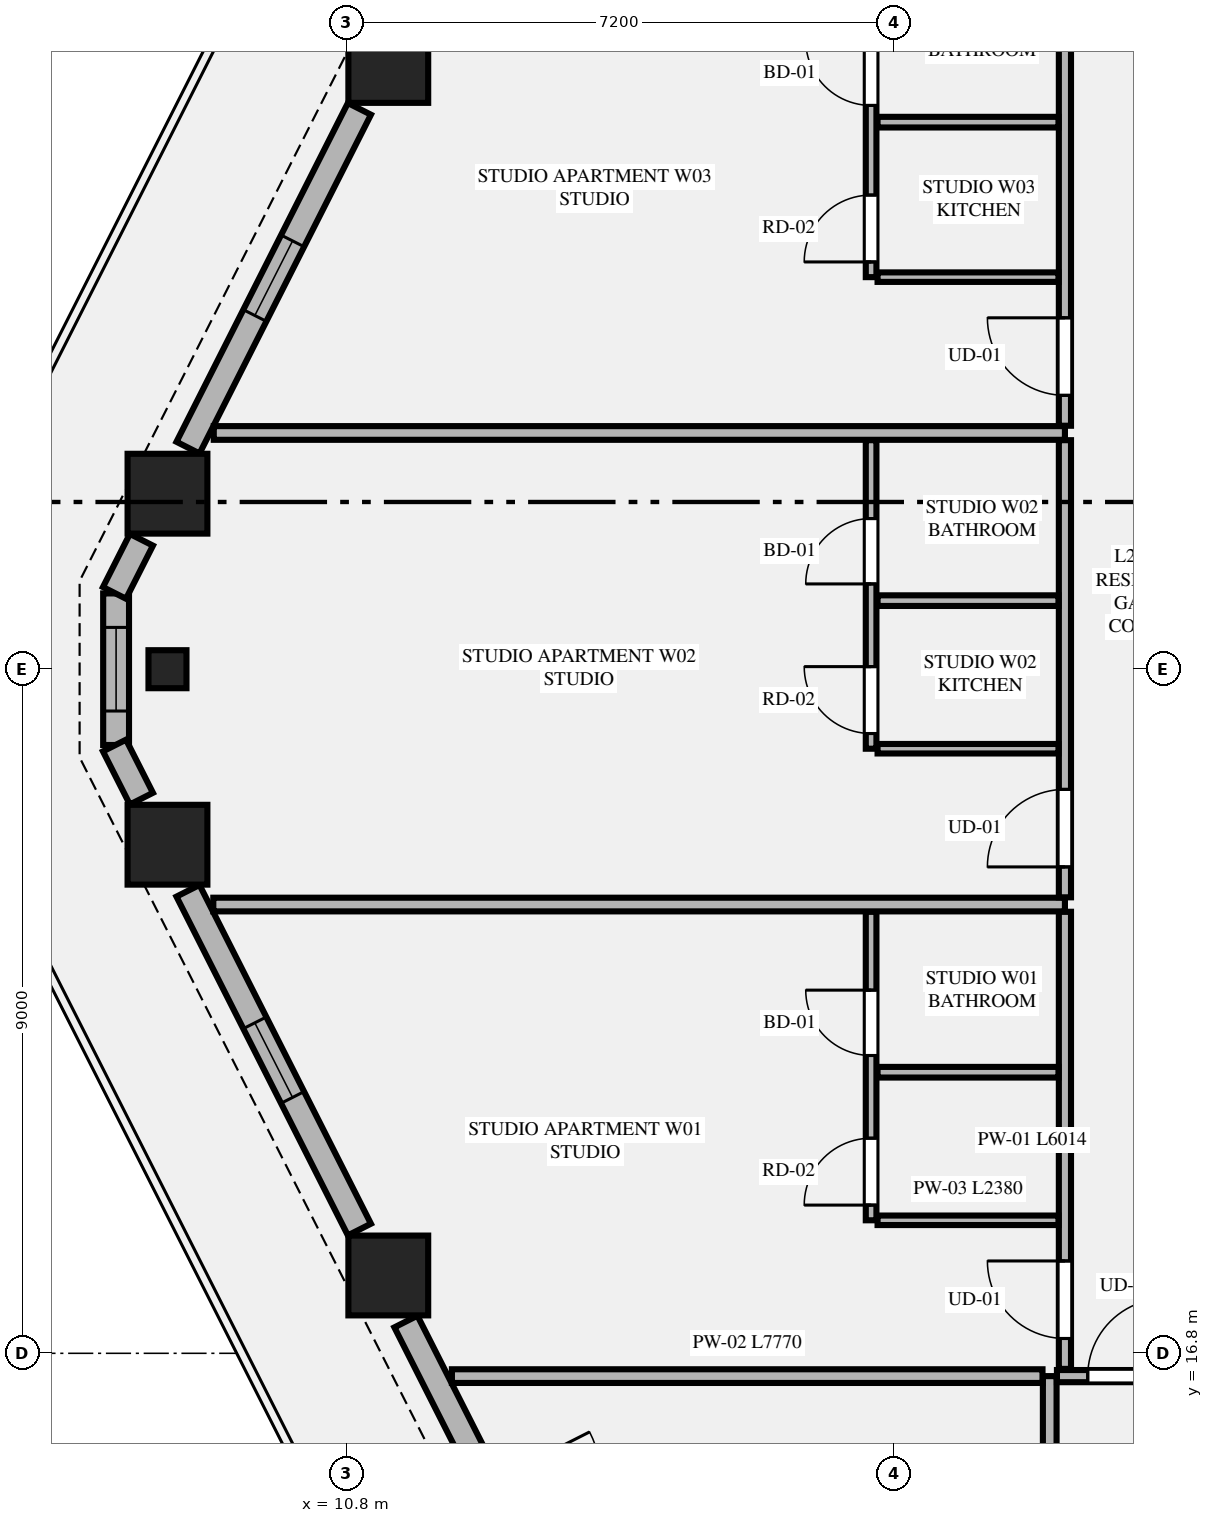
"""IFC4 building model, lengths in metres.
Left out: names, types, materials, properties, quantities, classifications, styles, units other than length and angle.
Written with IfcOpenShell. Run it as: python <this file> out.ifc"""

import sys

from ifc_helpers import new_model, si_unit, direction, frame, frame_2d, origin, origin_2d, place, context, subcontext, project, spatial, rectangle, extrude, element, fill, save


model = new_model("IFC4")
c1 = context("Model", 3, precision=1e-05, world=origin(), true_north=direction((0.0, 1.0)))
c2 = subcontext(c1, "Body", "Model", "MODEL_VIEW")
j1 = project(units=[si_unit("LENGTHUNIT", "METRE"), si_unit("PLANEANGLEUNIT", "RADIAN")], contexts=[c1])
p1 = place(None, origin())
s1 = spatial("IfcSite", under=j1, at=p1, CompositionType="ELEMENT")
p2 = place(p1, origin())
s2 = spatial("IfcBuilding", under=s1, at=p2, CompositionType="ELEMENT")
p3 = place(p2, frame((0.0, 0.0, 98.4)))
s3 = spatial("IfcBuildingStorey", under=s2, at=p3, CompositionType="ELEMENT", Elevation=98.4)
for number, where, z_axis, x_axis in (
    (1, (11.348, 33.776, 0.0), (0.0, 0.0, 1.0), (1.0, 0.0, 0.0)),
    (2, (8.443, 28.109, 0.0), (0.0, 0.0, 1.0), (1.0, 0.0, 0.0)),
    (3, (8.443, 23.491, 0.0), (0.0, 0.0, 1.0), (1.0, 0.0, 0.0)),
    (4, (11.348, 17.824, 0.0), (0.0, 0.0, 1.0), (1.0, 0.0, 0.0)),
):
    element("IfcColumn", number, at=place(p3, frame(where, z_axis=z_axis, x_axis=x_axis)), inside=s3, PredefinedType="COLUMN", context=c2, shape_type="SweptSolid", body=[
        extrude(rectangle(XDim=1.05, YDim=1.05, at=origin_2d()), origin(), (0.0, 0.0, 1.0), 3.55),
    ])
p4 = place(p3, frame((8.443, 25.8, 0.0), z_axis=(0.0, 0.0, 1.0), x_axis=(0.0, -1.0, 0.0)))
e5 = element("IfcColumn", 5, at=p4, inside=s3, PredefinedType="PILASTER", context=c2, shape_type="SweptSolid", body=[
    extrude(rectangle(XDim=0.5, YDim=0.35, at=origin_2d()), origin(), (0.0, 0.0, 1.0), 3.55),
])
p5 = place(p3, frame((7.767, 26.797, 0.0), z_axis=(0.0, 0.0, 1.0), x_axis=(0.0, -1.0, 0.0)))
e6 = element("IfcWall", 6, at=p5, inside=s3, PredefinedType="STANDARD", context=c2, shape_type="SweptSolid", body=[
    extrude(rectangle(XDim=1.994, YDim=0.34, at=frame_2d((0.997, 0.0))), origin(), (0.0, 0.0, 1.0), 3.34),
])
p6 = place(p5, frame((0.447, 0.0, 0.75)))
e7 = element("IfcOpeningElement", 7, at=p6, cuts=e6, PredefinedType="OPENING", context=c2, shape_type="SweptSolid", body=[
    extrude(rectangle(XDim=1.1, YDim=2.0, at=frame_2d((0.55, 1.0))), frame((0.0, 0.18, 0.0), z_axis=(0.0, -1.0, 0.0), x_axis=(1.0, 0.0, 0.0)), (0.0, 0.0, 1.0), 0.36),
])
p7 = place(p3, frame((10.968, 33.172, 0.0), z_axis=(0.0, 0.0, 1.0), x_axis=(-0.451470533039, -0.892286029139, 0.0)))
e8 = element("IfcWall", 8, at=p7, inside=s3, PredefinedType="STANDARD", context=c2, shape_type="SweptSolid", body=[
    extrude(rectangle(XDim=4.995, YDim=0.34, at=frame_2d((2.498, 0.0))), origin(), (0.0, 0.0, 1.0), 2.797),
])
p8 = place(p7, frame((1.947, 0.0, 0.75)))
e9 = element("IfcOpeningElement", 9, at=p8, cuts=e8, PredefinedType="OPENING", context=c2, shape_type="SweptSolid", body=[
    extrude(rectangle(XDim=1.1, YDim=1.897, at=frame_2d((0.55, 0.948))), frame((0.0, 0.18, 0.0), z_axis=(0.0, -1.0, 0.0), x_axis=(1.0, 0.0, 0.0)), (0.0, 0.0, 1.0), 0.36),
])
for number, where, z_axis, x_axis in (
    (10, (8.1, 27.503, 0.0), (0.0, 0.0, 1.0), (-0.452, -0.892, 0.0)),
    (11, (7.746, 24.796, 0.0), (0.0, 0.0, 1.0), (0.452, -0.892, 0.0)),
):
    element("IfcWall", number, at=place(p3, frame(where, z_axis=z_axis, x_axis=x_axis)), inside=s3, PredefinedType="STANDARD", context=c2, shape_type="SweptSolid", body=[
        extrude(rectangle(XDim=0.783, YDim=0.34, at=frame_2d((0.392, 0.0))), origin(), (0.0, 0.0, 1.0), 3.34),
    ])
p9 = place(p3, frame((8.713, 22.885, 0.0), z_axis=(0.0, 0.0, 1.0), x_axis=(0.451470533039, -0.892286029139, 0.0)))
e12 = element("IfcWall", 12, at=p9, inside=s3, PredefinedType="STANDARD", context=c2, shape_type="SweptSolid", body=[
    extrude(rectangle(XDim=4.995, YDim=0.34, at=frame_2d((2.498, 0.0))), origin(), (0.0, 0.0, 1.0), 2.797),
])
p10 = place(p9, frame((1.947, 0.0, 0.75)))
e13 = element("IfcOpeningElement", 13, at=p10, cuts=e12, PredefinedType="OPENING", context=c2, shape_type="SweptSolid", body=[
    extrude(rectangle(XDim=1.1, YDim=1.897, at=frame_2d((0.55, 0.948))), frame((0.0, 0.18, 0.0), z_axis=(0.0, -1.0, 0.0), x_axis=(1.0, 0.0, 0.0)), (0.0, 0.0, 1.0), 0.36),
])
p11 = place(p3, frame((11.58, 17.218, 0.0), z_axis=(0.0, 0.0, 1.0), x_axis=(0.451567731634, -0.892236842855, 0.0)))
e14 = element("IfcWall", 14, at=p11, inside=s3, PredefinedType="STANDARD", context=c2, shape_type="SweptSolid", body=[
    extrude(rectangle(XDim=5.219, YDim=0.34, at=frame_2d((2.61, 0.0))), origin(), (0.0, 0.0, 1.0), 2.797),
])
p12 = place(p11, frame((2.387, 0.0, 0.0)))
e15 = element("IfcOpeningElement", 15, at=p12, cuts=e14, PredefinedType="OPENING", context=c2, shape_type="SweptSolid", body=[
    extrude(rectangle(XDim=1.5, YDim=2.3, at=frame_2d((0.75, 1.15))), frame((0.0, 0.18, 0.0), z_axis=(0.0, -1.0, 0.0), x_axis=(1.0, 0.0, 0.0)), (0.0, 0.0, 1.0), 0.36),
])
p13 = place(p3, frame((20.05, 4.105, 0.0), z_axis=(0.0, 0.0, 1.0), x_axis=(0.0, 1.0, 0.0)))
e16 = element("IfcWall", 16, at=p13, inside=s3, PredefinedType="PARTITIONING", context=c2, shape_type="SweptSolid", body=[
    extrude(rectangle(XDim=12.395, YDim=0.18, at=frame_2d((6.198, 0.0))), origin(), (0.0, 0.0, 1.0), 3.34),
])
p14 = place(p3, frame((20.145, 16.5, 0.0), z_axis=(0.0, 0.0, 1.0), x_axis=(1.0, 0.0, 0.0)))
e17 = element("IfcWall", 17, at=p14, inside=s3, PredefinedType="PARTITIONING", context=c2, shape_type="SweptSolid", body=[
    extrude(rectangle(XDim=8.328, YDim=0.16, at=frame_2d((4.164, 0.0))), origin(), (0.0, 0.0, 1.0), 3.34),
])
p15 = place(p14, frame((0.405, 0.0, 0.0)))
e18 = element("IfcOpeningElement", 18, at=p15, cuts=e17, PredefinedType="OPENING", context=c2, shape_type="SweptSolid", body=[
    extrude(rectangle(XDim=1.02, YDim=2.25, at=frame_2d((0.51, 1.125))), frame((0.0, 0.09, 0.0), z_axis=(0.0, -1.0, 0.0), x_axis=(1.0, 0.0, 0.0)), (0.0, 0.0, 1.0), 0.18),
])
p16 = place(p3, frame((12.185, 16.5, 0.0), z_axis=(0.0, 0.0, 1.0), x_axis=(1.0, 0.0, 0.0)))
e19 = element("IfcWall", 19, at=p16, inside=s3, PredefinedType="PARTITIONING", context=c2, shape_type="SweptSolid", body=[
    extrude(rectangle(XDim=7.77, YDim=0.18, at=frame_2d((3.885, 0.0))), origin(), (0.0, 0.0, 1.0), 3.34),
])
p17 = place(p3, frame((20.25, 16.595, 0.0), z_axis=(0.0, 0.0, 1.0), x_axis=(0.0, 1.0, 0.0)))
e20 = element("IfcWall", 20, at=p17, inside=s3, PredefinedType="PARTITIONING", context=c2, shape_type="SweptSolid", body=[
    extrude(rectangle(XDim=6.014, YDim=0.16, at=frame_2d((3.007, 0.0))), origin(), (0.0, 0.0, 1.0), 3.34),
])
p18 = place(p17, frame((0.4, 0.0, 0.0)))
e21 = element("IfcOpeningElement", 21, at=p18, cuts=e20, PredefinedType="OPENING", context=c2, shape_type="SweptSolid", body=[
    extrude(rectangle(XDim=1.02, YDim=2.25, at=frame_2d((0.51, 1.125))), frame((0.0, 0.09, 0.0), z_axis=(0.0, -1.0, 0.0), x_axis=(1.0, 0.0, 0.0)), (0.0, 0.0, 1.0), 0.18),
])
p19 = place(p3, frame((17.785, 18.55, 0.0), z_axis=(0.0, 0.0, 1.0), x_axis=(1.0, 0.0, 0.0)))
e22 = element("IfcWall", 22, at=p19, inside=s3, PredefinedType="PARTITIONING", context=c2, shape_type="SweptSolid", body=[
    extrude(rectangle(XDim=2.38, YDim=0.125, at=frame_2d((1.19, 0.0))), origin(), (0.0, 0.0, 1.0), 2.722),
])
p20 = place(p3, frame((17.7, 18.55, 0.0), z_axis=(0.0, 0.0, 1.0), x_axis=(0.0, 1.0, 0.0)))
e23 = element("IfcWall", 23, at=p20, inside=s3, PredefinedType="PLUMBINGWALL", context=c2, shape_type="SweptSolid", body=[
    extrude(rectangle(XDim=4.059, YDim=0.14, at=frame_2d((2.029, 0.0))), origin(), (0.0, 0.0, 1.0), 3.34),
])
p21 = place(p20, frame((2.168, 0.0, 0.0)))
e24 = element("IfcOpeningElement", 24, at=p21, cuts=e23, PredefinedType="OPENING", context=c2, shape_type="SweptSolid", body=[
    extrude(rectangle(XDim=0.86, YDim=2.1, at=frame_2d((0.43, 1.05))), frame((0.0, 0.08, 0.0), z_axis=(0.0, -1.0, 0.0), x_axis=(1.0, 0.0, 0.0)), (0.0, 0.0, 1.0), 0.16),
])
p22 = place(p20, frame((0.2, 0.0, 0.0)))
e25 = element("IfcOpeningElement", 25, at=p22, cuts=e23, PredefinedType="OPENING", context=c2, shape_type="SweptSolid", body=[
    extrude(rectangle(XDim=0.88, YDim=2.15, at=frame_2d((0.44, 1.075))), frame((0.0, 0.08, 0.0), z_axis=(0.0, -1.0, 0.0), x_axis=(1.0, 0.0, 0.0)), (0.0, 0.0, 1.0), 0.16),
])
p23 = place(p3, frame((17.785, 20.498, 0.0), z_axis=(0.0, 0.0, 1.0), x_axis=(1.0, 0.0, 0.0)))
e26 = element("IfcWall", 26, at=p23, inside=s3, PredefinedType="PLUMBINGWALL", context=c2, shape_type="SweptSolid", body=[
    extrude(rectangle(XDim=2.38, YDim=0.14, at=frame_2d((1.19, 0.0))), origin(), (0.0, 0.0, 1.0), 3.34),
])
p24 = place(p3, frame((9.046, 22.704, 0.0), z_axis=(0.0, 0.0, 1.0), x_axis=(1.0, 0.0, 0.0)))
e27 = element("IfcWall", 27, at=p24, inside=s3, PredefinedType="PARTITIONING", context=c2, shape_type="SweptSolid", body=[
    extrude(rectangle(XDim=11.204, YDim=0.18, at=frame_2d((5.602, 0.0))), origin(), (0.0, 0.0, 1.0), 3.34),
])
p25 = place(p3, frame((20.25, 22.799, 0.0), z_axis=(0.0, 0.0, 1.0), x_axis=(0.0, 1.0, 0.0)))
e28 = element("IfcWall", 28, at=p25, inside=s3, PredefinedType="PARTITIONING", context=c2, shape_type="SweptSolid", body=[
    extrude(rectangle(XDim=6.014, YDim=0.16, at=frame_2d((3.007, 0.0))), origin(), (0.0, 0.0, 1.0), 3.34),
])
p26 = place(p25, frame((0.4, 0.0, 0.0)))
e29 = element("IfcOpeningElement", 29, at=p26, cuts=e28, PredefinedType="OPENING", context=c2, shape_type="SweptSolid", body=[
    extrude(rectangle(XDim=1.02, YDim=2.25, at=frame_2d((0.51, 1.125))), frame((0.0, 0.09, 0.0), z_axis=(0.0, -1.0, 0.0), x_axis=(1.0, 0.0, 0.0)), (0.0, 0.0, 1.0), 0.18),
])
p27 = place(p3, frame((17.785, 24.754, 0.0), z_axis=(0.0, 0.0, 1.0), x_axis=(1.0, 0.0, 0.0)))
e30 = element("IfcWall", 30, at=p27, inside=s3, PredefinedType="PARTITIONING", context=c2, shape_type="SweptSolid", body=[
    extrude(rectangle(XDim=2.38, YDim=0.125, at=frame_2d((1.19, 0.0))), origin(), (0.0, 0.0, 1.0), 3.34),
])
p28 = place(p3, frame((17.7, 24.754, 0.0), z_axis=(0.0, 0.0, 1.0), x_axis=(0.0, 1.0, 0.0)))
e31 = element("IfcWall", 31, at=p28, inside=s3, PredefinedType="PLUMBINGWALL", context=c2, shape_type="SweptSolid", body=[
    extrude(rectangle(XDim=4.059, YDim=0.14, at=frame_2d((2.03, 0.0))), origin(), (0.0, 0.0, 1.0), 3.34),
])
p29 = place(p28, frame((2.168, 0.0, 0.0)))
e32 = element("IfcOpeningElement", 32, at=p29, cuts=e31, PredefinedType="OPENING", context=c2, shape_type="SweptSolid", body=[
    extrude(rectangle(XDim=0.86, YDim=2.1, at=frame_2d((0.43, 1.05))), frame((0.0, 0.08, 0.0), z_axis=(0.0, -1.0, 0.0), x_axis=(1.0, 0.0, 0.0)), (0.0, 0.0, 1.0), 0.16),
])
p30 = place(p28, frame((0.2, 0.0, 0.0)))
e33 = element("IfcOpeningElement", 33, at=p30, cuts=e31, PredefinedType="OPENING", context=c2, shape_type="SweptSolid", body=[
    extrude(rectangle(XDim=0.88, YDim=2.15, at=frame_2d((0.44, 1.075))), frame((0.0, 0.08, 0.0), z_axis=(0.0, -1.0, 0.0), x_axis=(1.0, 0.0, 0.0)), (0.0, 0.0, 1.0), 0.16),
])
p31 = place(p3, frame((17.785, 26.702, 0.0), z_axis=(0.0, 0.0, 1.0), x_axis=(1.0, 0.0, 0.0)))
e34 = element("IfcWall", 34, at=p31, inside=s3, PredefinedType="PLUMBINGWALL", context=c2, shape_type="SweptSolid", body=[
    extrude(rectangle(XDim=2.38, YDim=0.14, at=frame_2d((1.19, 0.0))), origin(), (0.0, 0.0, 1.0), 3.34),
])
p32 = place(p3, frame((9.052, 28.908, 0.0), z_axis=(0.0, 0.0, 1.0), x_axis=(1.0, 0.0, 0.0)))
e35 = element("IfcWall", 35, at=p32, inside=s3, PredefinedType="PARTITIONING", context=c2, shape_type="SweptSolid", body=[
    extrude(rectangle(XDim=11.198, YDim=0.18, at=frame_2d((5.599, 0.0))), origin(), (0.0, 0.0, 1.0), 3.34),
])
p33 = place(p3, frame((20.25, 29.003, 0.0), z_axis=(0.0, 0.0, 1.0), x_axis=(0.0, 1.0, 0.0)))
e36 = element("IfcWall", 36, at=p33, inside=s3, PredefinedType="PARTITIONING", context=c2, shape_type="SweptSolid", body=[
    extrude(rectangle(XDim=6.202, YDim=0.16, at=frame_2d((3.101, 0.0))), origin(), (0.0, 0.0, 1.0), 3.34),
])
p34 = place(p33, frame((0.4, 0.0, 0.0)))
e37 = element("IfcOpeningElement", 37, at=p34, cuts=e36, PredefinedType="OPENING", context=c2, shape_type="SweptSolid", body=[
    extrude(rectangle(XDim=1.02, YDim=2.25, at=frame_2d((0.51, 1.125))), frame((0.0, 0.09, 0.0), z_axis=(0.0, -1.0, 0.0), x_axis=(1.0, 0.0, 0.0)), (0.0, 0.0, 1.0), 0.18),
])
p35 = place(p3, frame((17.785, 30.958, 0.0), z_axis=(0.0, 0.0, 1.0), x_axis=(1.0, 0.0, 0.0)))
e38 = element("IfcWall", 38, at=p35, inside=s3, PredefinedType="PARTITIONING", context=c2, shape_type="SweptSolid", body=[
    extrude(rectangle(XDim=2.38, YDim=0.125, at=frame_2d((1.19, 0.0))), origin(), (0.0, 0.0, 1.0), 3.34),
])
p36 = place(p3, frame((17.7, 30.958, 0.0), z_axis=(0.0, 0.0, 1.0), x_axis=(0.0, 1.0, 0.0)))
e39 = element("IfcWall", 39, at=p36, inside=s3, PredefinedType="PLUMBINGWALL", context=c2, shape_type="SweptSolid", body=[
    extrude(rectangle(XDim=4.247, YDim=0.14, at=frame_2d((2.124, 0.0))), origin(), (0.0, 0.0, 1.0), 3.34),
])
p37 = place(p36, frame((2.259, 0.0, 0.0)))
e40 = element("IfcOpeningElement", 40, at=p37, cuts=e39, PredefinedType="OPENING", context=c2, shape_type="SweptSolid", body=[
    extrude(rectangle(XDim=0.86, YDim=2.1, at=frame_2d((0.43, 1.05))), frame((0.0, 0.08, 0.0), z_axis=(0.0, -1.0, 0.0), x_axis=(1.0, 0.0, 0.0)), (0.0, 0.0, 1.0), 0.16),
])
p38 = place(p36, frame((0.2, 0.0, 0.0)))
e41 = element("IfcOpeningElement", 41, at=p38, cuts=e39, PredefinedType="OPENING", context=c2, shape_type="SweptSolid", body=[
    extrude(rectangle(XDim=0.88, YDim=2.15, at=frame_2d((0.44, 1.075))), frame((0.0, 0.08, 0.0), z_axis=(0.0, -1.0, 0.0), x_axis=(1.0, 0.0, 0.0)), (0.0, 0.0, 1.0), 0.16),
])
p39 = place(p3, frame((17.785, 32.997, 0.0), z_axis=(0.0, 0.0, 1.0), x_axis=(1.0, 0.0, 0.0)))
e42 = element("IfcWall", 42, at=p39, inside=s3, PredefinedType="PLUMBINGWALL", context=c2, shape_type="SweptSolid", body=[
    extrude(rectangle(XDim=2.38, YDim=0.14, at=frame_2d((1.19, 0.0))), origin(), (0.0, 0.0, 1.0), 3.34),
])
p40 = place(p8, origin())
e43 = element("IfcWindow", 43, at=p40, inside=s3, PartitioningType="SINGLE_PANEL", PredefinedType="WINDOW", context=c2, shape_type="SweptSolid", body=[
    extrude(rectangle(XDim=1.1, YDim=1.897, at=frame_2d((0.55, 0.948))), frame((0.0, 0.03, 0.0), z_axis=(0.0, -1.0, 0.0), x_axis=(1.0, 0.0, 0.0)), (0.0, 0.0, 1.0), 0.06),
])
fill(e9, e43)
p41 = place(p10, origin())
e44 = element("IfcWindow", 44, at=p41, inside=s3, PartitioningType="SINGLE_PANEL", PredefinedType="WINDOW", context=c2, shape_type="SweptSolid", body=[
    extrude(rectangle(XDim=1.1, YDim=1.897, at=frame_2d((0.55, 0.948))), frame((0.0, 0.03, 0.0), z_axis=(0.0, -1.0, 0.0), x_axis=(1.0, 0.0, 0.0)), (0.0, 0.0, 1.0), 0.06),
])
fill(e13, e44)
p42 = place(p15, origin())
e45 = element("IfcDoor", 45, at=p42, inside=s3, OperationType="SINGLE_SWING_RIGHT", PredefinedType="DOOR", context=c2, shape_type="SweptSolid", body=[
    extrude(rectangle(XDim=1.02, YDim=2.25, at=frame_2d((0.51, 1.125))), frame((0.0, 0.025, 0.0), z_axis=(0.0, -1.0, 0.0), x_axis=(1.0, 0.0, 0.0)), (0.0, 0.0, 1.0), 0.05),
])
fill(e18, e45)
p43 = place(p21, origin())
e46 = element("IfcDoor", 46, at=p43, inside=s3, OperationType="SINGLE_SWING_RIGHT", PredefinedType="DOOR", context=c2, shape_type="SweptSolid", body=[
    extrude(rectangle(XDim=0.86, YDim=2.1, at=frame_2d((0.43, 1.05))), frame((0.0, 0.025, 0.0), z_axis=(0.0, -1.0, 0.0), x_axis=(1.0, 0.0, 0.0)), (0.0, 0.0, 1.0), 0.05),
])
fill(e24, e46)
p44 = place(p18, origin())
e47 = element("IfcDoor", 47, at=p44, inside=s3, OperationType="SINGLE_SWING_RIGHT", PredefinedType="DOOR", context=c2, shape_type="SweptSolid", body=[
    extrude(rectangle(XDim=1.02, YDim=2.25, at=frame_2d((0.51, 1.125))), frame((0.0, 0.025, 0.0), z_axis=(0.0, -1.0, 0.0), x_axis=(1.0, 0.0, 0.0)), (0.0, 0.0, 1.0), 0.05),
])
fill(e21, e47)
p45 = place(p22, origin())
e48 = element("IfcDoor", 48, at=p45, inside=s3, OperationType="SINGLE_SWING_LEFT", PredefinedType="DOOR", context=c2, shape_type="SweptSolid", body=[
    extrude(rectangle(XDim=0.88, YDim=2.15, at=frame_2d((0.44, 1.075))), frame((0.0, 0.025, 0.0), z_axis=(0.0, -1.0, 0.0), x_axis=(1.0, 0.0, 0.0)), (0.0, 0.0, 1.0), 0.05),
])
fill(e25, e48)
p46 = place(p29, origin())
e49 = element("IfcDoor", 49, at=p46, inside=s3, OperationType="SINGLE_SWING_LEFT", PredefinedType="DOOR", context=c2, shape_type="SweptSolid", body=[
    extrude(rectangle(XDim=0.86, YDim=2.1, at=frame_2d((0.43, 1.05))), frame((0.0, 0.025, 0.0), z_axis=(0.0, -1.0, 0.0), x_axis=(1.0, 0.0, 0.0)), (0.0, 0.0, 1.0), 0.05),
])
fill(e32, e49)
p47 = place(p26, origin())
e50 = element("IfcDoor", 50, at=p47, inside=s3, OperationType="SINGLE_SWING_LEFT", PredefinedType="DOOR", context=c2, shape_type="SweptSolid", body=[
    extrude(rectangle(XDim=1.02, YDim=2.25, at=frame_2d((0.51, 1.125))), frame((0.0, 0.025, 0.0), z_axis=(0.0, -1.0, 0.0), x_axis=(1.0, 0.0, 0.0)), (0.0, 0.0, 1.0), 0.05),
])
fill(e29, e50)
p48 = place(p30, origin())
e51 = element("IfcDoor", 51, at=p48, inside=s3, OperationType="SINGLE_SWING_RIGHT", PredefinedType="DOOR", context=c2, shape_type="SweptSolid", body=[
    extrude(rectangle(XDim=0.88, YDim=2.15, at=frame_2d((0.44, 1.075))), frame((0.0, 0.025, 0.0), z_axis=(0.0, -1.0, 0.0), x_axis=(1.0, 0.0, 0.0)), (0.0, 0.0, 1.0), 0.05),
])
fill(e33, e51)
p49 = place(p37, origin())
e52 = element("IfcDoor", 52, at=p49, inside=s3, OperationType="SINGLE_SWING_RIGHT", PredefinedType="DOOR", context=c2, shape_type="SweptSolid", body=[
    extrude(rectangle(XDim=0.86, YDim=2.1, at=frame_2d((0.43, 1.05))), frame((0.0, 0.025, 0.0), z_axis=(0.0, -1.0, 0.0), x_axis=(1.0, 0.0, 0.0)), (0.0, 0.0, 1.0), 0.05),
])
fill(e40, e52)
p50 = place(p34, origin())
e53 = element("IfcDoor", 53, at=p50, inside=s3, OperationType="SINGLE_SWING_RIGHT", PredefinedType="DOOR", context=c2, shape_type="SweptSolid", body=[
    extrude(rectangle(XDim=1.02, YDim=2.25, at=frame_2d((0.51, 1.125))), frame((0.0, 0.025, 0.0), z_axis=(0.0, -1.0, 0.0), x_axis=(1.0, 0.0, 0.0)), (0.0, 0.0, 1.0), 0.05),
])
fill(e37, e53)
p51 = place(p38, origin())
e54 = element("IfcDoor", 54, at=p51, inside=s3, OperationType="SINGLE_SWING_LEFT", PredefinedType="DOOR", context=c2, shape_type="SweptSolid", body=[
    extrude(rectangle(XDim=0.88, YDim=2.15, at=frame_2d((0.44, 1.075))), frame((0.0, 0.025, 0.0), z_axis=(0.0, -1.0, 0.0), x_axis=(1.0, 0.0, 0.0)), (0.0, 0.0, 1.0), 0.05),
])
fill(e41, e54)
p52 = place(p6, origin())
e55 = element("IfcWindow", 55, at=p52, inside=s3, PartitioningType="SINGLE_PANEL", PredefinedType="WINDOW", context=c2, shape_type="SweptSolid", body=[
    extrude(rectangle(XDim=1.1, YDim=2.0, at=frame_2d((0.55, 1.0))), frame((0.0, 0.03, 0.0), z_axis=(0.0, -1.0, 0.0), x_axis=(1.0, 0.0, 0.0)), (0.0, 0.0, 1.0), 0.06),
])
fill(e7, e55)
save(model, sys.argv[1])
